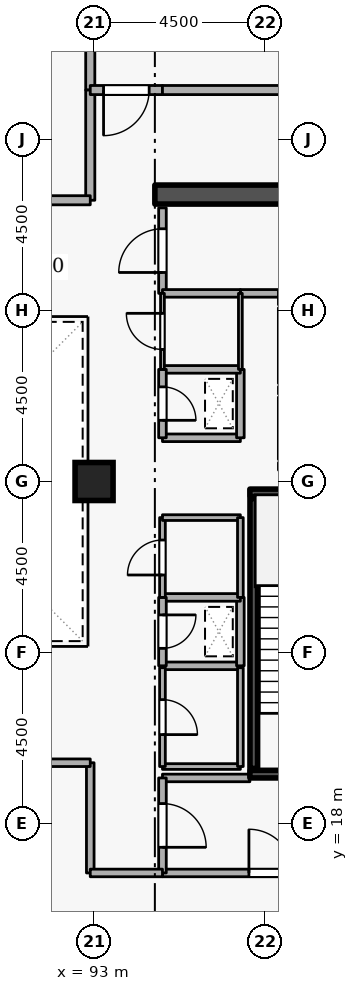
"""IFC4 building model, lengths in metres.
Left out: names, types, materials, properties, quantities, classifications, styles, units other than length and angle.
Written with IfcOpenShell. Run it as: python <this file> out.ifc"""

import sys

from ifc_helpers import new_model, si_unit, direction, frame, frame_2d, origin, origin_2d, place, context, subcontext, project, spatial, rectangle, extrude, element, fill, save


model = new_model("IFC4")
c1 = context("Model", 3, precision=1e-05, world=origin(), true_north=direction((0.0, 1.0)))
c2 = subcontext(c1, "Body", "Model", "MODEL_VIEW")
j1 = project(units=[si_unit("LENGTHUNIT", "METRE"), si_unit("PLANEANGLEUNIT", "RADIAN")], contexts=[c1])
p1 = place(None, origin())
s1 = spatial("IfcSite", under=j1, at=p1, CompositionType="ELEMENT")
p2 = place(p1, origin())
s2 = spatial("IfcBuilding", under=s1, at=p2, CompositionType="ELEMENT")
p3 = place(p2, frame((0.0, 0.0, 221.7)))
s3 = spatial("IfcBuildingStorey", under=s2, at=p3, CompositionType="ELEMENT", Elevation=221.7)
p4 = place(p3, frame((94.6, 34.55, 0.0), z_axis=(0.0, 0.0, 1.0), x_axis=(1.0, 0.0, 0.0)))
e1 = element("IfcWall", 1, at=p4, inside=s3, PredefinedType="SHEAR", context=c2, shape_type="SweptSolid", body=[
    extrude(rectangle(XDim=5.8, YDim=0.5, at=frame_2d((2.9, 0.0))), origin(), (0.0, 0.0, 1.0), 4.2),
])
p5 = place(p3, frame((93.0, 27.0, 0.0), z_axis=(0.0, 0.0, 1.0), x_axis=(1.0, 0.0, 0.0)))
e2 = element("IfcColumn", 2, at=p5, inside=s3, PredefinedType="COLUMN", context=c2, shape_type="SweptSolid", body=[
    extrude(rectangle(XDim=1.0, YDim=1.0, at=origin_2d()), origin(), (0.0, 0.0, 1.0), 4.2),
])
p6 = place(p3, frame((97.95, 29.22, 0.0), z_axis=(0.0, 0.0, 1.0), x_axis=(0.0, -1.0, 0.0)))
e3 = element("IfcWall", 3, at=p6, inside=s3, PredefinedType="STANDARD", context=c2, shape_type="SweptSolid", body=[
    extrude(rectangle(XDim=1.64, YDim=0.2, at=frame_2d((0.82, 0.0))), origin(), (0.0, 0.0, 1.0), 3.94),
])
p7 = place(p6, frame((0.31, 0.0, 0.0)))
e4 = element("IfcOpeningElement", 4, at=p7, cuts=e3, PredefinedType="OPENING", context=c2, shape_type="SweptSolid", body=[
    extrude(rectangle(XDim=1.02, YDim=2.06, at=frame_2d((0.51, 1.03))), frame((0.0, 0.11, 0.0), z_axis=(0.0, -1.0, 0.0), x_axis=(1.0, 0.0, 0.0)), (0.0, 0.0, 1.0), 0.22),
])
p8 = place(p3, frame((97.95, 31.57, 0.0), z_axis=(0.0, 0.0, 1.0), x_axis=(0.0, -1.0, 0.0)))
e5 = element("IfcWall", 5, at=p8, inside=s3, PredefinedType="STANDARD", context=c2, shape_type="SweptSolid", body=[
    extrude(rectangle(XDim=1.99, YDim=0.2, at=frame_2d((0.995, 0.0))), origin(), (0.0, 0.0, 1.0), 3.94),
])
p9 = place(p8, frame((0.485, 0.0, 0.0)))
e6 = element("IfcOpeningElement", 6, at=p9, cuts=e5, PredefinedType="OPENING", context=c2, shape_type="SweptSolid", body=[
    extrude(rectangle(XDim=1.02, YDim=2.06, at=frame_2d((0.51, 1.03))), frame((0.0, 0.11, 0.0), z_axis=(0.0, -1.0, 0.0), x_axis=(1.0, 0.0, 0.0)), (0.0, 0.0, 1.0), 0.22),
])
p10 = place(p3, frame((100.45, 19.3, 0.0), z_axis=(0.0, 0.0, 1.0), x_axis=(-1.0, 0.0, 0.0)))
e7 = element("IfcWall", 7, at=p10, inside=s3, PredefinedType="SHEAR", context=c2, shape_type="SweptSolid", body=[
    extrude(rectangle(XDim=3.35, YDim=0.2, at=frame_2d((1.675, 0.0))), origin(), (0.0, 0.0, 1.0), 4.2),
])
p11 = place(p10, frame((1.125, 0.0, 0.0)))
e8 = element("IfcOpeningElement", 8, at=p11, cuts=e7, PredefinedType="OPENING", context=c2, shape_type="SweptSolid", body=[
    extrude(rectangle(XDim=1.1, YDim=2.1, at=frame_2d((0.55, 1.05))), frame((0.0, 0.11, 0.0), z_axis=(0.0, -1.0, 0.0), x_axis=(1.0, 0.0, 0.0)), (0.0, 0.0, 1.0), 0.22),
])
p12 = place(p3, frame((97.1, 26.7, 0.0), z_axis=(0.0, 0.0, 1.0), x_axis=(1.0, 0.0, 0.0)))
e9 = element("IfcWall", 9, at=p12, inside=s3, PredefinedType="SHEAR", context=c2, shape_type="SweptSolid", body=[
    extrude(rectangle(XDim=3.35, YDim=0.2, at=frame_2d((1.675, 0.0))), origin(), (0.0, 0.0, 1.0), 4.2),
])
p13 = place(p3, frame((97.203, 26.55, 0.0), z_axis=(0.0, 0.0, 1.0), x_axis=(0.0, -1.0, 0.0)))
e10 = element("IfcWall", 10, at=p13, inside=s3, PredefinedType="SHEAR", context=c2, shape_type="SweptSolid", body=[
    extrude(rectangle(XDim=7.1, YDim=0.2, at=frame_2d((3.55, 0.0))), origin(), (0.0, 0.0, 1.0), 4.2),
])
p14 = place(p3, frame((94.8, 16.7, 0.0), z_axis=(0.0, 0.0, 1.0), x_axis=(1.0, 0.0, 0.0)))
e11 = element("IfcWall", 11, at=p14, inside=s3, PredefinedType="STANDARD", context=c2, shape_type="SweptSolid", body=[
    extrude(rectangle(XDim=5.7, YDim=0.2, at=frame_2d((2.85, 0.0))), origin(), (0.0, 0.0, 1.0), 3.94),
])
p15 = place(p14, frame((2.275, 0.0, 0.0)))
e12 = element("IfcOpeningElement", 12, at=p15, cuts=e11, PredefinedType="OPENING", context=c2, shape_type="SweptSolid", body=[
    extrude(rectangle(XDim=1.15, YDim=2.1, at=frame_2d((0.575, 1.05))), frame((0.0, 0.11, 0.0), z_axis=(0.0, -1.0, 0.0), x_axis=(1.0, 0.0, 0.0)), (0.0, 0.0, 1.0), 0.22),
])
p16 = place(p3, frame((97.1, 19.2, 0.0), z_axis=(0.0, 0.0, 1.0), x_axis=(-1.0, 0.0, 0.0)))
e13 = element("IfcWall", 13, at=p16, inside=s3, PredefinedType="STANDARD", context=c2, shape_type="SweptSolid", body=[
    extrude(rectangle(XDim=2.3, YDim=0.2, at=frame_2d((1.15, 0.0))), origin(), (0.0, 0.0, 1.0), 3.145),
])
p17 = place(p3, frame((94.8, 19.2, 0.0), z_axis=(0.0, 0.0, 1.0), x_axis=(0.0, -1.0, 0.0)))
e14 = element("IfcWall", 14, at=p17, inside=s3, PredefinedType="STANDARD", context=c2, shape_type="SweptSolid", body=[
    extrude(rectangle(XDim=2.5, YDim=0.2, at=frame_2d((1.25, 0.0))), origin(), (0.0, 0.0, 1.0), 3.94),
])
p18 = place(p17, frame((0.675, 0.0, 0.0)))
e15 = element("IfcOpeningElement", 15, at=p18, cuts=e14, PredefinedType="OPENING", context=c2, shape_type="SweptSolid", body=[
    extrude(rectangle(XDim=1.15, YDim=2.1, at=frame_2d((0.575, 1.05))), frame((0.0, 0.11, 0.0), z_axis=(0.0, -1.0, 0.0), x_axis=(1.0, 0.0, 0.0)), (0.0, 0.0, 1.0), 0.22),
])
p19 = place(p3, frame((94.8, 28.15, 0.0), z_axis=(0.0, 0.0, 1.0), x_axis=(1.0, 0.0, 0.0)))
e16 = element("IfcWall", 16, at=p19, inside=s3, PredefinedType="STANDARD", context=c2, shape_type="SweptSolid", body=[
    extrude(rectangle(XDim=2.05, YDim=0.2, at=frame_2d((1.025, 0.0))), origin(), (0.0, 0.0, 1.0), 3.94),
])
p20 = place(p3, frame((96.85, 28.15, 0.0), z_axis=(0.0, 0.0, 1.0), x_axis=(0.0, 1.0, 0.0)))
e17 = element("IfcWall", 17, at=p20, inside=s3, PredefinedType="STANDARD", context=c2, shape_type="SweptSolid", body=[
    extrude(rectangle(XDim=1.8, YDim=0.2, at=frame_2d((0.9, 0.0))), origin(), (0.0, 0.0, 1.0), 3.94),
])
p21 = place(p3, frame((96.85, 29.95, 0.0), z_axis=(0.0, 0.0, 1.0), x_axis=(-1.0, 0.0, 0.0)))
e18 = element("IfcWall", 18, at=p21, inside=s3, PredefinedType="STANDARD", context=c2, shape_type="SweptSolid", body=[
    extrude(rectangle(XDim=2.05, YDim=0.2, at=frame_2d((1.025, 0.0))), origin(), (0.0, 0.0, 1.0), 3.94),
])
p22 = place(p3, frame((94.8, 29.95, 0.0), z_axis=(0.0, 0.0, 1.0), x_axis=(0.0, -1.0, 0.0)))
e19 = element("IfcWall", 19, at=p22, inside=s3, PredefinedType="STANDARD", context=c2, shape_type="SweptSolid", body=[
    extrude(rectangle(XDim=1.8, YDim=0.2, at=frame_2d((0.9, 0.0))), origin(), (0.0, 0.0, 1.0), 3.94),
])
p23 = place(p22, frame((0.46, 0.0, 0.0)))
e20 = element("IfcOpeningElement", 20, at=p23, cuts=e19, PredefinedType="OPENING", context=c2, shape_type="SweptSolid", body=[
    extrude(rectangle(XDim=0.88, YDim=2.04, at=frame_2d((0.44, 1.02))), frame((0.0, 0.11, 0.0), z_axis=(0.0, -1.0, 0.0), x_axis=(1.0, 0.0, 0.0)), (0.0, 0.0, 1.0), 0.22),
])
p24 = place(p3, frame((94.8, 22.15, 0.0), z_axis=(0.0, 0.0, 1.0), x_axis=(1.0, 0.0, 0.0)))
e21 = element("IfcWall", 21, at=p24, inside=s3, PredefinedType="STANDARD", context=c2, shape_type="SweptSolid", body=[
    extrude(rectangle(XDim=2.05, YDim=0.2, at=frame_2d((1.025, 0.0))), origin(), (0.0, 0.0, 1.0), 3.94),
])
p25 = place(p3, frame((96.85, 22.15, 0.0), z_axis=(0.0, 0.0, 1.0), x_axis=(0.0, 1.0, 0.0)))
e22 = element("IfcWall", 22, at=p25, inside=s3, PredefinedType="STANDARD", context=c2, shape_type="SweptSolid", body=[
    extrude(rectangle(XDim=1.8, YDim=0.2, at=frame_2d((0.9, 0.0))), origin(), (0.0, 0.0, 1.0), 3.94),
])
p26 = place(p3, frame((96.85, 23.95, 0.0), z_axis=(0.0, 0.0, 1.0), x_axis=(-1.0, 0.0, 0.0)))
e23 = element("IfcWall", 23, at=p26, inside=s3, PredefinedType="STANDARD", context=c2, shape_type="SweptSolid", body=[
    extrude(rectangle(XDim=2.05, YDim=0.2, at=frame_2d((1.025, 0.0))), origin(), (0.0, 0.0, 1.0), 3.94),
])
p27 = place(p3, frame((94.8, 23.95, 0.0), z_axis=(0.0, 0.0, 1.0), x_axis=(0.0, -1.0, 0.0)))
e24 = element("IfcWall", 24, at=p27, inside=s3, PredefinedType="STANDARD", context=c2, shape_type="SweptSolid", body=[
    extrude(rectangle(XDim=1.8, YDim=0.2, at=frame_2d((0.9, 0.0))), origin(), (0.0, 0.0, 1.0), 3.94),
])
p28 = place(p27, frame((0.46, 0.0, 0.0)))
e25 = element("IfcOpeningElement", 25, at=p28, cuts=e24, PredefinedType="OPENING", context=c2, shape_type="SweptSolid", body=[
    extrude(rectangle(XDim=0.88, YDim=2.04, at=frame_2d((0.44, 1.02))), frame((0.0, 0.11, 0.0), z_axis=(0.0, -1.0, 0.0), x_axis=(1.0, 0.0, 0.0)), (0.0, 0.0, 1.0), 0.22),
])
p29 = place(p3, frame((94.8, 31.95, 0.0), z_axis=(0.0, 0.0, 1.0), x_axis=(0.0, 1.0, 0.0)))
e26 = element("IfcWall", 26, at=p29, inside=s3, PredefinedType="STANDARD", context=c2, shape_type="SweptSolid", body=[
    extrude(rectangle(XDim=2.25, YDim=0.2, at=frame_2d((1.125, 0.0))), origin(), (0.0, 0.0, 1.0), 3.94),
])
p30 = place(p29, frame((0.55, 0.0, 0.0)))
e27 = element("IfcOpeningElement", 27, at=p30, cuts=e26, PredefinedType="OPENING", context=c2, shape_type="SweptSolid", body=[
    extrude(rectangle(XDim=1.15, YDim=2.1, at=frame_2d((0.575, 1.05))), frame((0.0, 0.11, 0.0), z_axis=(0.0, -1.0, 0.0), x_axis=(1.0, 0.0, 0.0)), (0.0, 0.0, 1.0), 0.22),
])
p31 = place(p3, frame((97.852, 31.95, 0.0), z_axis=(0.0, 0.0, 1.0), x_axis=(-1.0, 0.0, 0.0)))
e28 = element("IfcWall", 28, at=p31, inside=s3, PredefinedType="STANDARD", context=c2, shape_type="SweptSolid", body=[
    extrude(rectangle(XDim=1.002, YDim=0.2, at=frame_2d((0.501, 0.0))), origin(), (0.0, 0.0, 1.0), 3.94),
])
p32 = place(p3, frame((96.85, 31.95, 0.0), z_axis=(0.0, 0.0, 1.0), x_axis=(-1.0, 0.0, 0.0)))
e29 = element("IfcWall", 29, at=p32, inside=s3, PredefinedType="STANDARD", context=c2, shape_type="SweptSolid", body=[
    extrude(rectangle(XDim=2.05, YDim=0.2, at=frame_2d((1.025, 0.0))), origin(), (0.0, 0.0, 1.0), 3.94),
])
p33 = place(p3, frame((92.9, 41.05, 0.0), z_axis=(0.0, 0.0, 1.0), x_axis=(0.0, -1.0, 0.0)))
e30 = element("IfcWall", 30, at=p33, inside=s3, PredefinedType="STANDARD", context=c2, shape_type="SweptSolid", body=[
    extrude(rectangle(XDim=3.75, YDim=0.24, at=frame_2d((1.875, 0.0))), origin(), (0.0, 0.0, 1.0), 3.94),
])
p34 = place(p3, frame((92.9, 37.3, 0.0), z_axis=(0.0, 0.0, 1.0), x_axis=(0.0, -1.0, 0.0)))
e31 = element("IfcWall", 31, at=p34, inside=s3, PredefinedType="STANDARD", context=c2, shape_type="SweptSolid", body=[
    extrude(rectangle(XDim=2.9, YDim=0.24, at=frame_2d((1.45, 0.0))), origin(), (0.0, 0.0, 1.0), 3.94),
])
p35 = place(p3, frame((92.9, 34.4, 0.0), z_axis=(0.0, 0.0, 1.0), x_axis=(-1.0, 0.0, 0.0)))
e32 = element("IfcWall", 32, at=p35, inside=s3, PredefinedType="STANDARD", context=c2, shape_type="SweptSolid", body=[
    extrude(rectangle(XDim=4.4, YDim=0.24, at=frame_2d((2.2, 0.0))), origin(), (0.0, 0.0, 1.0), 3.145),
])
p36 = place(p35, frame((1.6, 0.0, 0.0)))
e33 = element("IfcOpeningElement", 33, at=p36, cuts=e32, PredefinedType="OPENING", context=c2, shape_type="SweptSolid", body=[
    extrude(rectangle(XDim=1.2, YDim=2.1, at=frame_2d((0.6, 1.05))), frame((0.0, 0.13, 0.0), z_axis=(0.0, -1.0, 0.0), x_axis=(1.0, 0.0, 0.0)), (0.0, 0.0, 1.0), 0.26),
])
p37 = place(p3, frame((92.9, 19.6, 0.0), z_axis=(0.0, 0.0, 1.0), x_axis=(0.0, -1.0, 0.0)))
e34 = element("IfcWall", 34, at=p37, inside=s3, PredefinedType="STANDARD", context=c2, shape_type="SweptSolid", body=[
    extrude(rectangle(XDim=2.9, YDim=0.2, at=frame_2d((1.45, 0.0))), origin(), (0.0, 0.0, 1.0), 3.94),
])
p38 = place(p3, frame((92.9, 16.7, 0.0), z_axis=(0.0, 0.0, 1.0), x_axis=(1.0, 0.0, 0.0)))
e35 = element("IfcWall", 35, at=p38, inside=s3, PredefinedType="STANDARD", context=c2, shape_type="SweptSolid", body=[
    extrude(rectangle(XDim=1.9, YDim=0.2, at=frame_2d((0.95, 0.0))), origin(), (0.0, 0.0, 1.0), 3.94),
])
p39 = place(p3, frame((88.5, 19.6, 0.0), z_axis=(0.0, 0.0, 1.0), x_axis=(1.0, 0.0, 0.0)))
e36 = element("IfcWall", 36, at=p39, inside=s3, PredefinedType="STANDARD", context=c2, shape_type="SweptSolid", body=[
    extrude(rectangle(XDim=4.4, YDim=0.2, at=frame_2d((2.2, 0.0))), origin(), (0.0, 0.0, 1.0), 3.145),
])
p40 = place(p3, frame((94.8, 37.3, 0.0), z_axis=(0.0, 0.0, 1.0), x_axis=(-1.0, 0.0, 0.0)))
e37 = element("IfcWall", 37, at=p40, inside=s3, PredefinedType="STANDARD", context=c2, shape_type="SweptSolid", body=[
    extrude(rectangle(XDim=1.9, YDim=0.24, at=frame_2d((0.95, 0.0))), origin(), (0.0, 0.0, 1.0), 3.94),
])
p41 = place(p40, frame((0.35, 0.0, 0.0)))
e38 = element("IfcOpeningElement", 38, at=p41, cuts=e37, PredefinedType="OPENING", context=c2, shape_type="SweptSolid", body=[
    extrude(rectangle(XDim=1.2, YDim=2.1, at=frame_2d((0.6, 1.05))), frame((0.0, 0.13, 0.0), z_axis=(0.0, -1.0, 0.0), x_axis=(1.0, 0.0, 0.0)), (0.0, 0.0, 1.0), 0.26),
])
p42 = place(p3, frame((100.3, 37.3, 0.0), z_axis=(0.0, 0.0, 1.0), x_axis=(-1.0, 0.0, 0.0)))
e39 = element("IfcWall", 39, at=p42, inside=s3, PredefinedType="STANDARD", context=c2, shape_type="SweptSolid", body=[
    extrude(rectangle(XDim=5.5, YDim=0.24, at=frame_2d((2.75, 0.0))), origin(), (0.0, 0.0, 1.0), 3.94),
])
p43 = place(p3, frame((94.8, 19.5, 0.0), z_axis=(0.0, 0.0, 1.0), x_axis=(1.0, 0.0, 0.0)))
e40 = element("IfcWall", 40, at=p43, inside=s3, PredefinedType="PARTITIONING", context=c2, shape_type="SweptSolid", body=[
    extrude(rectangle(XDim=2.05, YDim=0.15, at=frame_2d((1.025, 0.0))), origin(), (0.0, 0.0, 1.0), 3.145),
])
p44 = place(p3, frame((96.85, 19.5, 0.0), z_axis=(0.0, 0.0, 1.0), x_axis=(0.0, 1.0, 0.0)))
e41 = element("IfcWall", 41, at=p44, inside=s3, PredefinedType="PARTITIONING", context=c2, shape_type="SweptSolid", body=[
    extrude(rectangle(XDim=2.6, YDim=0.15, at=frame_2d((1.3, 0.0))), origin(), (0.0, 0.0, 1.0), 3.94),
])
p45 = place(p3, frame((94.8, 22.1, 0.0), z_axis=(0.0, 0.0, 1.0), x_axis=(0.0, -1.0, 0.0)))
e42 = element("IfcWall", 42, at=p45, inside=s3, PredefinedType="PARTITIONING", context=c2, shape_type="SweptSolid", body=[
    extrude(rectangle(XDim=2.6, YDim=0.15, at=frame_2d((1.3, 0.0))), origin(), (0.0, 0.0, 1.0), 3.94),
])
p46 = place(p45, frame((0.84, 0.0, 0.0)))
e43 = element("IfcOpeningElement", 43, at=p46, cuts=e42, PredefinedType="OPENING", context=c2, shape_type="SweptSolid", body=[
    extrude(rectangle(XDim=0.92, YDim=2.08, at=frame_2d((0.46, 1.04))), frame((0.0, 0.085, 0.0), z_axis=(0.0, -1.0, 0.0), x_axis=(1.0, 0.0, 0.0)), (0.0, 0.0, 1.0), 0.17),
])
p47 = place(p3, frame((94.8, 23.95, 0.0), z_axis=(0.0, 0.0, 1.0), x_axis=(0.0, 1.0, 0.0)))
e44 = element("IfcWall", 44, at=p47, inside=s3, PredefinedType="PARTITIONING", context=c2, shape_type="SweptSolid", body=[
    extrude(rectangle(XDim=2.1, YDim=0.15, at=frame_2d((1.05, 0.0))), origin(), (0.0, 0.0, 1.0), 3.94),
])
p48 = place(p47, frame((0.59, 0.0, 0.0)))
e45 = element("IfcOpeningElement", 45, at=p48, cuts=e44, PredefinedType="OPENING", context=c2, shape_type="SweptSolid", body=[
    extrude(rectangle(XDim=0.92, YDim=2.08, at=frame_2d((0.46, 1.04))), frame((0.0, 0.085, 0.0), z_axis=(0.0, -1.0, 0.0), x_axis=(1.0, 0.0, 0.0)), (0.0, 0.0, 1.0), 0.17),
])
p49 = place(p3, frame((94.8, 26.05, 0.0), z_axis=(0.0, 0.0, 1.0), x_axis=(1.0, 0.0, 0.0)))
e46 = element("IfcWall", 46, at=p49, inside=s3, PredefinedType="PARTITIONING", context=c2, shape_type="SweptSolid", body=[
    extrude(rectangle(XDim=2.05, YDim=0.15, at=frame_2d((1.025, 0.0))), origin(), (0.0, 0.0, 1.0), 3.94),
])
p50 = place(p3, frame((96.85, 26.05, 0.0), z_axis=(0.0, 0.0, 1.0), x_axis=(0.0, -1.0, 0.0)))
e47 = element("IfcWall", 47, at=p50, inside=s3, PredefinedType="PARTITIONING", context=c2, shape_type="SweptSolid", body=[
    extrude(rectangle(XDim=2.1, YDim=0.15, at=frame_2d((1.05, 0.0))), origin(), (0.0, 0.0, 1.0), 3.94),
])
p51 = place(p3, frame((94.8, 29.95, 0.0), z_axis=(0.0, 0.0, 1.0), x_axis=(0.0, 1.0, 0.0)))
e48 = element("IfcWall", 48, at=p51, inside=s3, PredefinedType="PARTITIONING", context=c2, shape_type="SweptSolid", body=[
    extrude(rectangle(XDim=2.0, YDim=0.1, at=frame_2d((1.0, 0.0))), origin(), (0.0, 0.0, 1.0), 3.94),
])
p52 = place(p51, frame((0.525, 0.0, 0.0)))
e49 = element("IfcOpeningElement", 49, at=p52, cuts=e48, PredefinedType="OPENING", context=c2, shape_type="SweptSolid", body=[
    extrude(rectangle(XDim=0.95, YDim=2.1, at=frame_2d((0.475, 1.05))), frame((0.0, 0.06, 0.0), z_axis=(0.0, -1.0, 0.0), x_axis=(1.0, 0.0, 0.0)), (0.0, 0.0, 1.0), 0.12),
])
p53 = place(p3, frame((96.85, 31.95, 0.0), z_axis=(0.0, 0.0, 1.0), x_axis=(0.0, -1.0, 0.0)))
e50 = element("IfcWall", 50, at=p53, inside=s3, PredefinedType="PARTITIONING", context=c2, shape_type="SweptSolid", body=[
    extrude(rectangle(XDim=2.0, YDim=0.1, at=frame_2d((1.0, 0.0))), origin(), (0.0, 0.0, 1.0), 3.94),
])
p54 = place(p18, origin())
e51 = element("IfcDoor", 51, at=p54, inside=s3, OperationType="SINGLE_SWING_RIGHT", PredefinedType="DOOR", context=c2, shape_type="SweptSolid", body=[
    extrude(rectangle(XDim=1.15, YDim=2.1, at=frame_2d((0.575, 1.05))), frame((0.0, 0.025, 0.0), z_axis=(0.0, -1.0, 0.0), x_axis=(1.0, 0.0, 0.0)), (0.0, 0.0, 1.0), 0.05),
])
fill(e15, e51)
p55 = place(p23, origin())
e52 = element("IfcDoor", 52, at=p55, inside=s3, OperationType="SINGLE_SWING_RIGHT", PredefinedType="DOOR", context=c2, shape_type="SweptSolid", body=[
    extrude(rectangle(XDim=0.88, YDim=2.04, at=frame_2d((0.44, 1.02))), frame((0.0, 0.025, 0.0), z_axis=(0.0, -1.0, 0.0), x_axis=(1.0, 0.0, 0.0)), (0.0, 0.0, 1.0), 0.05),
])
fill(e20, e52)
p56 = place(p28, origin())
e53 = element("IfcDoor", 53, at=p56, inside=s3, OperationType="SINGLE_SWING_LEFT", PredefinedType="DOOR", context=c2, shape_type="SweptSolid", body=[
    extrude(rectangle(XDim=0.88, YDim=2.04, at=frame_2d((0.44, 1.02))), frame((0.0, 0.025, 0.0), z_axis=(0.0, -1.0, 0.0), x_axis=(1.0, 0.0, 0.0)), (0.0, 0.0, 1.0), 0.05),
])
fill(e25, e53)
p57 = place(p46, origin())
e54 = element("IfcDoor", 54, at=p57, inside=s3, OperationType="SINGLE_SWING_RIGHT", PredefinedType="DOOR", context=c2, shape_type="SweptSolid", body=[
    extrude(rectangle(XDim=0.92, YDim=2.08, at=frame_2d((0.46, 1.04))), frame((0.0, 0.025, 0.0), z_axis=(0.0, -1.0, 0.0), x_axis=(1.0, 0.0, 0.0)), (0.0, 0.0, 1.0), 0.05),
])
fill(e43, e54)
p58 = place(p48, origin())
e55 = element("IfcDoor", 55, at=p58, inside=s3, OperationType="SINGLE_SWING_LEFT", PredefinedType="DOOR", context=c2, shape_type="SweptSolid", body=[
    extrude(rectangle(XDim=0.92, YDim=2.08, at=frame_2d((0.46, 1.04))), frame((0.0, 0.025, 0.0), z_axis=(0.0, -1.0, 0.0), x_axis=(1.0, 0.0, 0.0)), (0.0, 0.0, 1.0), 0.05),
])
fill(e45, e55)
p59 = place(p52, origin())
e56 = element("IfcDoor", 56, at=p59, inside=s3, OperationType="SINGLE_SWING_RIGHT", PredefinedType="DOOR", context=c2, shape_type="SweptSolid", body=[
    extrude(rectangle(XDim=0.95, YDim=2.1, at=frame_2d((0.475, 1.05))), frame((0.0, 0.025, 0.0), z_axis=(0.0, -1.0, 0.0), x_axis=(1.0, 0.0, 0.0)), (0.0, 0.0, 1.0), 0.05),
])
fill(e49, e56)
p60 = place(p30, origin())
e57 = element("IfcDoor", 57, at=p60, inside=s3, OperationType="SINGLE_SWING_LEFT", PredefinedType="DOOR", context=c2, shape_type="SweptSolid", body=[
    extrude(rectangle(XDim=1.15, YDim=2.1, at=frame_2d((0.575, 1.05))), frame((0.0, 0.025, 0.0), z_axis=(0.0, -1.0, 0.0), x_axis=(1.0, 0.0, 0.0)), (0.0, 0.0, 1.0), 0.05),
])
fill(e27, e57)
p61 = place(p15, origin())
e58 = element("IfcDoor", 58, at=p61, inside=s3, OperationType="SINGLE_SWING_LEFT", PredefinedType="DOOR", context=c2, shape_type="SweptSolid", body=[
    extrude(rectangle(XDim=1.15, YDim=2.1, at=frame_2d((0.575, 1.05))), frame((0.0, 0.025, 0.0), z_axis=(0.0, -1.0, 0.0), x_axis=(1.0, 0.0, 0.0)), (0.0, 0.0, 1.0), 0.05),
])
fill(e12, e58)
p62 = place(p41, origin())
e59 = element("IfcDoor", 59, at=p62, inside=s3, OperationType="SINGLE_SWING_RIGHT", PredefinedType="DOOR", context=c2, shape_type="SweptSolid", body=[
    extrude(rectangle(XDim=1.2, YDim=2.1, at=frame_2d((0.6, 1.05))), frame((0.0, 0.025, 0.0), z_axis=(0.0, -1.0, 0.0), x_axis=(1.0, 0.0, 0.0)), (0.0, 0.0, 1.0), 0.05),
])
fill(e38, e59)
save(model, sys.argv[1])
